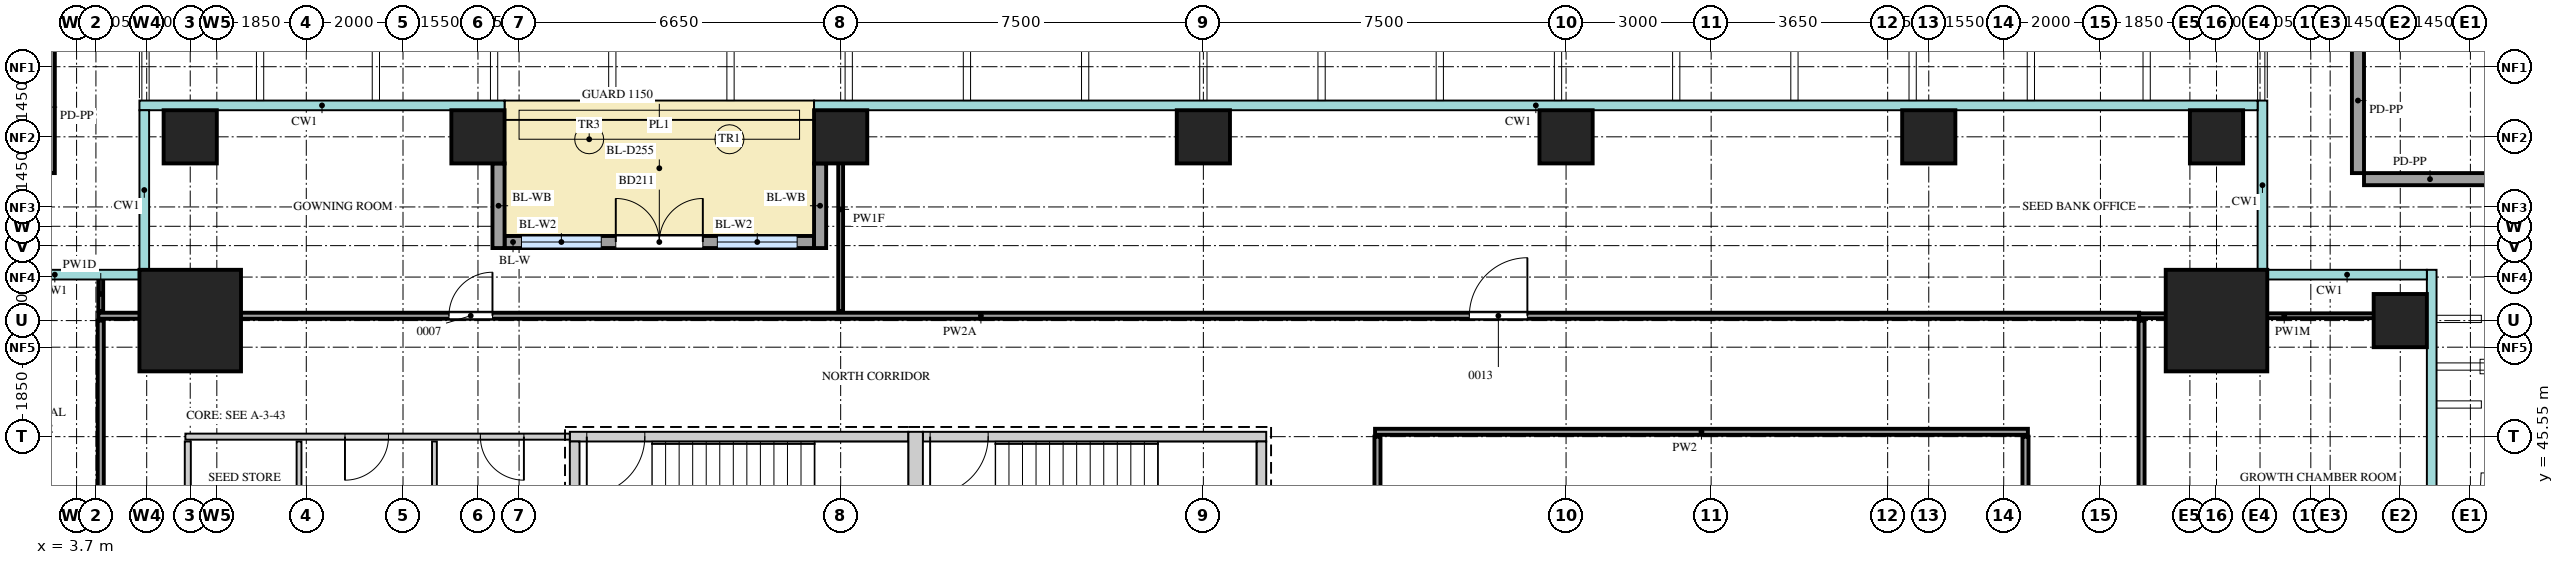
"""IFC4 building model, lengths in metres.
Left out: names, types, materials, properties, quantities, classifications, styles, units other than length and angle.
Written with IfcOpenShell. Run it as: python <this file> out.ifc"""

import sys

from ifc_helpers import new_model, si_unit, direction, frame, frame_2d, origin, origin_2d, place, context, subcontext, project, spatial, rectangle, extrude, source, transform, mapped, element, fill, save


model = new_model("IFC4")
c1 = context("Model", 3, precision=1e-05, world=origin(), true_north=direction((0.0, 1.0)))
c2 = subcontext(c1, "Body", "Model", "MODEL_VIEW")
j1 = project(units=[si_unit("LENGTHUNIT", "METRE"), si_unit("PLANEANGLEUNIT", "RADIAN")], contexts=[c1])
p1 = place(None, origin())
s1 = spatial("IfcSite", under=j1, at=p1, CompositionType="ELEMENT")
p2 = place(p1, origin())
s2 = spatial("IfcBuilding", under=s1, at=p2, CompositionType="ELEMENT")
p3 = place(p2, frame((0.0, 0.0, 101.5)))
s3 = spatial("IfcBuildingStorey", under=s2, at=p3, CompositionType="ELEMENT", Elevation=101.5)
m1 = source(origin(), c2, "Body", "SweptSolid", [
    extrude(rectangle(XDim=7.0, YDim=0.2, at=frame_2d((3.5, 0.0))), origin(), (0.0, 0.0, 1.0), 4.1),
])
p4 = place(p3, frame((13.9, 45.55, 0.0), z_axis=(0.0, 0.0, 1.0), x_axis=(1.0, 0.0, 0.0)))
e1 = element("IfcWall", 1, at=p4, inside=s3, PredefinedType="SHEAR", context=c2, shape_type="MappedRepresentation", body=[
    mapped(m1, transform((0.0, 0.0, 0.0))),
])
m2 = source(origin(), c2, "Body", "SweptSolid", [
    extrude(rectangle(XDim=1.2, YDim=2.1, at=frame_2d((0.6, 1.05))), frame((0.0, 0.11, 0.0), z_axis=(0.0, -1.0, 0.0), x_axis=(1.0, 0.0, 0.0)), (0.0, 0.0, 1.0), 0.22),
])
p5 = place(p4, frame((0.35, 0.0, 0.0)))
e2 = element("IfcOpeningElement", 2, at=p5, cuts=e1, PredefinedType="OPENING", context=c2, shape_type="MappedRepresentation", body=[
    mapped(m2, transform((0.0, 0.0, 0.0))),
])
m3 = source(origin(), c2, "Body", "SweptSolid", [
    extrude(rectangle(XDim=7.1, YDim=0.2, at=frame_2d((3.55, 0.0))), origin(), (0.0, 0.0, 1.0), 4.1),
])
p6 = place(p3, frame((21.2, 45.55, 0.0), z_axis=(0.0, 0.0, 1.0), x_axis=(1.0, 0.0, 0.0)))
e3 = element("IfcWall", 3, at=p6, inside=s3, PredefinedType="SHEAR", context=c2, shape_type="MappedRepresentation", body=[
    mapped(m3, transform((0.0, 0.0, 0.0))),
])
p7 = place(p6, frame((0.15, 0.0, 0.0)))
e4 = element("IfcOpeningElement", 4, at=p7, cuts=e3, PredefinedType="OPENING", context=c2, shape_type="MappedRepresentation", body=[
    mapped(m2, transform((0.0, 0.0, 0.0))),
])
m4 = source(origin(), c2, "Body", "SweptSolid", [
    extrude(rectangle(XDim=3.75, YDim=0.3, at=frame_2d((1.875, 0.0))), origin(), (0.0, 0.0, 1.0), 4.1),
])
p8 = place(p3, frame((21.05, 41.9, 0.0), z_axis=(0.0, 0.0, 1.0), x_axis=(0.0, 1.0, 0.0)))
e5 = element("IfcWall", 5, at=p8, inside=s3, PredefinedType="SHEAR", context=c2, shape_type="MappedRepresentation", body=[
    mapped(m4, transform((0.0, 0.0, 0.0))),
])
m5 = source(origin(), c2, "Body", "SweptSolid", [
    extrude(rectangle(XDim=3.35, YDim=0.2, at=frame_2d((1.675, 0.0))), origin(), (0.0, 0.0, 1.0), 4.1),
])
for number, where, z_axis, x_axis in (
    (6, (14.0, 42.1, 0.0), (0.0, 0.0, 1.0), (0.0, 1.0, 0.0)),
    (7, (28.2, 42.1, 0.0), (0.0, 0.0, 1.0), (0.0, 1.0, 0.0)),
):
    element("IfcWall", number, at=place(p3, frame(where, z_axis=z_axis, x_axis=x_axis)), inside=s3, PredefinedType="SHEAR", context=c2, shape_type="MappedRepresentation", body=[
        mapped(m5, transform((0.0, 0.0, 0.0))),
    ])
m6 = source(origin(), c2, "Body", "SweptSolid", [
    extrude(rectangle(XDim=2.1, YDim=2.1, at=origin_2d()), origin(), (0.0, 0.0, 1.0), 4.4),
])
for number, where, z_axis, x_axis in (
    (8, (47.95, 47.95, 0.0), (0.0, 0.0, 1.0), (1.0, 0.0, 0.0)),
    (9, (6.05, 47.95, 0.0), (0.0, 0.0, 1.0), (1.0, 0.0, 0.0)),
):
    element("IfcColumn", number, at=place(p3, frame(where, z_axis=z_axis, x_axis=x_axis)), inside=s3, PredefinedType="COLUMN", context=c2, shape_type="MappedRepresentation", body=[
        mapped(m6, transform((0.0, 0.0, 0.0))),
    ])
m7 = source(origin(), c2, "Body", "SweptSolid", [
    extrude(rectangle(XDim=1.1, YDim=1.1, at=origin_2d()), origin(), (0.0, 0.0, 1.0), 4.1),
])
for number, where, z_axis, x_axis in (
    (10, (51.75, 47.95, 0.0), (0.0, 0.0, 1.0), (1.0, 0.0, 0.0)),
    (11, (6.05, 51.75, 0.0), (0.0, 0.0, 1.0), (1.0, 0.0, 0.0)),
    (12, (12.0, 51.75, 0.0), (0.0, 0.0, 1.0), (1.0, 0.0, 0.0)),
    (13, (19.5, 51.75, 0.0), (0.0, 0.0, 1.0), (1.0, 0.0, 0.0)),
    (14, (27.0, 51.75, 0.0), (0.0, 0.0, 1.0), (1.0, 0.0, 0.0)),
    (15, (34.5, 51.75, 0.0), (0.0, 0.0, 1.0), (1.0, 0.0, 0.0)),
    (16, (42.0, 51.75, 0.0), (0.0, 0.0, 1.0), (1.0, 0.0, 0.0)),
    (17, (47.95, 51.75, 0.0), (0.0, 0.0, 1.0), (1.0, 0.0, 0.0)),
):
    element("IfcColumn", number, at=place(p3, frame(where, z_axis=z_axis, x_axis=x_axis)), inside=s3, PredefinedType="COLUMN", context=c2, shape_type="MappedRepresentation", body=[
        mapped(m7, transform((0.0, 0.0, 0.0))),
    ])
m8 = source(origin(), c2, "Body", "SweptSolid", [
    extrude(rectangle(XDim=6.4, YDim=0.25, at=frame_2d((3.2, 0.0))), origin(), (0.0, 0.0, 1.0), 4.1),
])
p9 = place(p3, frame((12.55, 49.575, 0.0), z_axis=(0.0, 0.0, 1.0), x_axis=(1.0, 0.0, 0.0)))
e18 = element("IfcWall", 18, at=p9, inside=s3, PredefinedType="SOLIDWALL", context=c2, shape_type="MappedRepresentation", body=[
    mapped(m8, transform((0.0, 0.0, 0.0))),
])
m9 = source(origin(), c2, "Body", "SweptSolid", [
    extrude(rectangle(XDim=1.65, YDim=2.4, at=frame_2d((0.825, 1.2))), frame((0.0, 0.135, 0.0), z_axis=(0.0, -1.0, 0.0), x_axis=(1.0, 0.0, 0.0)), (0.0, 0.0, 1.0), 0.27),
])
p10 = place(p9, frame((0.35, 0.0, 0.0)))
e19 = element("IfcOpeningElement", 19, at=p10, cuts=e18, PredefinedType="OPENING", context=c2, shape_type="MappedRepresentation", body=[
    mapped(m9, transform((0.0, 0.0, 0.0))),
])
p11 = place(p9, frame((4.4, 0.0, 0.0)))
e20 = element("IfcOpeningElement", 20, at=p11, cuts=e18, PredefinedType="OPENING", context=c2, shape_type="MappedRepresentation", body=[
    mapped(m9, transform((0.0, 0.0, 0.0))),
])
m10 = source(origin(), c2, "Body", "SweptSolid", [
    extrude(rectangle(XDim=1.8, YDim=2.4, at=frame_2d((0.9, 1.2))), frame((0.0, 0.135, 0.0), z_axis=(0.0, -1.0, 0.0), x_axis=(1.0, 0.0, 0.0)), (0.0, 0.0, 1.0), 0.27),
])
p12 = place(p9, frame((2.3, 0.0, 0.0)))
e21 = element("IfcOpeningElement", 21, at=p12, cuts=e18, PredefinedType="OPENING", context=c2, shape_type="MappedRepresentation", body=[
    mapped(m10, transform((0.0, 0.0, 0.0))),
])
m11 = source(origin(), c2, "Body", "SweptSolid", [
    extrude(rectangle(XDim=1.75, YDim=0.25, at=frame_2d((0.875, 0.0))), origin(), (0.0, 0.0, 1.0), 3.8),
])
for number, where, z_axis, x_axis in (
    (22, (12.425, 51.2, 0.0), (0.0, 0.0, 1.0), (0.0, -1.0, 0.0)),
    (23, (19.075, 51.2, 0.0), (0.0, 0.0, 1.0), (0.0, -1.0, 0.0)),
):
    element("IfcWall", number, at=place(p3, frame(where, z_axis=z_axis, x_axis=x_axis)), inside=s3, PredefinedType="SOLIDWALL", context=c2, shape_type="MappedRepresentation", body=[
        mapped(m11, transform((0.0, 0.0, 0.0))),
    ])
m12 = source(origin(), c2, "Body", "SweptSolid", [
    extrude(rectangle(XDim=2.73, YDim=0.25, at=frame_2d((1.365, 0.0))), origin(), (0.0, 0.0, 1.0), 1.1),
])
p13 = place(p3, frame((53.73, 50.875, 0.0), z_axis=(0.0, 0.0, 1.0), x_axis=(-1.0, 0.0, 0.0)))
e24 = element("IfcWall", 24, at=p13, inside=s3, PredefinedType="SOLIDWALL", context=c2, shape_type="MappedRepresentation", body=[
    mapped(m12, transform((0.0, 0.0, 0.0))),
])
m13 = source(origin(), c2, "Body", "SweptSolid", [
    extrude(rectangle(XDim=3.0, YDim=0.25, at=frame_2d((1.5, 0.0))), origin(), (0.0, 0.0, 1.0), 1.1),
])
p14 = place(p3, frame((50.875, 51.0, 0.0), z_axis=(0.0, 0.0, 1.0), x_axis=(0.0, 1.0, 0.0)))
e25 = element("IfcWall", 25, at=p14, inside=s3, PredefinedType="SOLIDWALL", context=c2, shape_type="MappedRepresentation", body=[
    mapped(m13, transform((0.0, 0.0, 0.0))),
])
p15 = place(p3, frame((3.125, 53.73, 0.0), z_axis=(0.0, 0.0, 1.0), x_axis=(0.0, -1.0, 0.0)))
e26 = element("IfcWall", 26, at=p15, inside=s3, PredefinedType="SOLIDWALL", context=c2, shape_type="MappedRepresentation", body=[
    mapped(m12, transform((0.0, 0.0, 0.0))),
])
m14 = source(origin(), c2, "Body", "SweptSolid", [
    extrude(rectangle(XDim=41.8, YDim=0.125, at=frame_2d((20.9, 0.0))), origin(), (0.0, 0.0, 1.0), 4.2),
])
p16 = place(p3, frame((4.2, 6.15, 0.0), z_axis=(0.0, 0.0, 1.0), x_axis=(0.0, 1.0, 0.0)))
e27 = element("IfcWall", 27, at=p16, inside=s3, PredefinedType="PARTITIONING", context=c2, shape_type="MappedRepresentation", body=[
    mapped(m14, transform((0.0, 0.0, 0.0))),
])
m15 = source(origin(), c2, "Body", "SweptSolid", [
    extrude(rectangle(XDim=0.9, YDim=2.1, at=frame_2d((0.45, 1.05))), frame((0.0, 0.073, 0.0), z_axis=(0.0, -1.0, 0.0), x_axis=(1.0, 0.0, 0.0)), (0.0, 0.0, 1.0), 0.145),
])
p17 = place(p16, frame((7.2, 0.0, 0.0)))
e28 = element("IfcOpeningElement", 28, at=p17, cuts=e27, PredefinedType="OPENING", context=c2, shape_type="MappedRepresentation", body=[
    mapped(m15, transform((0.0, 0.0, 0.0))),
])
p18 = place(p16, frame((21.8, 0.0, 0.0)))
e29 = element("IfcOpeningElement", 29, at=p18, cuts=e27, PredefinedType="OPENING", context=c2, shape_type="MappedRepresentation", body=[
    mapped(m15, transform((0.0, 0.0, 0.0))),
])
p19 = place(p16, frame((33.3, 0.0, 0.0)))
e30 = element("IfcOpeningElement", 30, at=p19, cuts=e27, PredefinedType="OPENING", context=c2, shape_type="MappedRepresentation", body=[
    mapped(m15, transform((0.0, 0.0, 0.0))),
])
m16 = source(origin(), c2, "Body", "SweptSolid", [
    extrude(rectangle(XDim=37.65, YDim=0.125, at=frame_2d((18.825, 0.0))), origin(), (0.0, 0.0, 1.0), 4.2),
])
p20 = place(p3, frame((46.4, 10.3, 0.0), z_axis=(0.0, 0.0, 1.0), x_axis=(0.0, 1.0, 0.0)))
e31 = element("IfcWall", 31, at=p20, inside=s3, PredefinedType="PARTITIONING", context=c2, shape_type="MappedRepresentation", body=[
    mapped(m16, transform((0.0, 0.0, 0.0))),
])
m17 = source(origin(), c2, "Body", "SweptSolid", [
    extrude(rectangle(XDim=1.2, YDim=2.1, at=frame_2d((0.6, 1.05))), frame((0.0, 0.073, 0.0), z_axis=(0.0, -1.0, 0.0), x_axis=(1.0, 0.0, 0.0)), (0.0, 0.0, 1.0), 0.145),
])
p21 = place(p20, frame((7.85, 0.0, 0.0)))
e32 = element("IfcOpeningElement", 32, at=p21, cuts=e31, PredefinedType="OPENING", context=c2, shape_type="MappedRepresentation", body=[
    mapped(m17, transform((0.0, 0.0, 0.0))),
])
p22 = place(p20, frame((23.6, 0.0, 0.0)))
e33 = element("IfcOpeningElement", 33, at=p22, cuts=e31, PredefinedType="OPENING", context=c2, shape_type="MappedRepresentation", body=[
    mapped(m17, transform((0.0, 0.0, 0.0))),
])
p23 = place(p20, frame((32.9, 0.0, 0.0)))
e34 = element("IfcOpeningElement", 34, at=p23, cuts=e31, PredefinedType="OPENING", context=c2, shape_type="MappedRepresentation", body=[
    mapped(m17, transform((0.0, 0.0, 0.0))),
])
m18 = source(origin(), c2, "Body", "SweptSolid", [
    extrude(rectangle(XDim=32.85, YDim=0.125, at=frame_2d((16.425, 0.0))), origin(), (0.0, 0.0, 1.0), 4.2),
])
p24 = place(p3, frame((44.0, 12.7, 0.0), z_axis=(0.0, 0.0, 1.0), x_axis=(0.0, 1.0, 0.0)))
e35 = element("IfcWall", 35, at=p24, inside=s3, PredefinedType="PARTITIONING", context=c2, shape_type="MappedRepresentation", body=[
    mapped(m18, transform((0.0, 0.0, 0.0))),
])
p25 = place(p24, frame((9.2, 0.0, 0.0)))
e36 = element("IfcOpeningElement", 36, at=p25, cuts=e35, PredefinedType="OPENING", context=c2, shape_type="MappedRepresentation", body=[
    mapped(m17, transform((0.0, 0.0, 0.0))),
])
p26 = place(p24, frame((27.5, 0.0, 0.0)))
e37 = element("IfcOpeningElement", 37, at=p26, cuts=e35, PredefinedType="OPENING", context=c2, shape_type="MappedRepresentation", body=[
    mapped(m17, transform((0.0, 0.0, 0.0))),
])
m19 = source(origin(), c2, "Body", "SweptSolid", [
    extrude(rectangle(XDim=9.45, YDim=0.125, at=frame_2d((4.725, 0.0))), origin(), (0.0, 0.0, 1.0), 4.2),
])
p27 = place(p3, frame((30.6, 36.1, 0.0), z_axis=(0.0, 0.0, 1.0), x_axis=(0.0, 1.0, 0.0)))
e38 = element("IfcWall", 38, at=p27, inside=s3, PredefinedType="PARTITIONING", context=c2, shape_type="MappedRepresentation", body=[
    mapped(m19, transform((0.0, 0.0, 0.0))),
])
m20 = source(origin(), c2, "Body", "SweptSolid", [
    extrude(rectangle(XDim=3.45, YDim=0.125, at=frame_2d((1.725, 0.0))), origin(), (0.0, 0.0, 1.0), 4.2),
])
p28 = place(p3, frame((6.0, 42.0, 0.0), z_axis=(0.0, 0.0, 1.0), x_axis=(0.0, 1.0, 0.0)))
e39 = element("IfcWall", 39, at=p28, inside=s3, PredefinedType="PARTITIONING", context=c2, shape_type="MappedRepresentation", body=[
    mapped(m20, transform((0.0, 0.0, 0.0))),
])
p29 = place(p28, frame((1.2, 0.0, 0.0)))
e40 = element("IfcOpeningElement", 40, at=p29, cuts=e39, PredefinedType="OPENING", context=c2, shape_type="MappedRepresentation", body=[
    mapped(m15, transform((0.0, 0.0, 0.0))),
])
m21 = source(origin(), c2, "Body", "SweptSolid", [
    extrude(rectangle(XDim=3.45, YDim=0.1, at=frame_2d((1.725, 0.0))), origin(), (0.0, 0.0, 1.0), 4.2),
])
for number, where, z_axis, x_axis in (
    (41, (8.3, 42.0, 0.0), (0.0, 0.0, 1.0), (0.0, 1.0, 0.0)),
    (42, (11.1, 42.0, 0.0), (0.0, 0.0, 1.0), (0.0, 1.0, 0.0)),
):
    element("IfcWall", number, at=place(p3, frame(where, z_axis=z_axis, x_axis=x_axis)), inside=s3, PredefinedType="PARTITIONING", context=c2, shape_type="MappedRepresentation", body=[
        mapped(m21, transform((0.0, 0.0, 0.0))),
    ])
m22 = source(origin(), c2, "Body", "SweptSolid", [
    extrude(rectangle(XDim=7.95, YDim=0.125, at=frame_2d((3.975, 0.0))), origin(), (0.0, 0.0, 1.0), 4.2),
])
p30 = place(p3, frame((5.95, 45.55, 0.0), z_axis=(0.0, 0.0, 1.0), x_axis=(1.0, 0.0, 0.0)))
e43 = element("IfcWall", 43, at=p30, inside=s3, PredefinedType="PARTITIONING", context=c2, shape_type="MappedRepresentation", body=[
    mapped(m22, transform((0.0, 0.0, 0.0))),
])
p31 = place(p30, frame((3.3, 0.0, 0.0)))
e44 = element("IfcOpeningElement", 44, at=p31, cuts=e43, PredefinedType="OPENING", context=c2, shape_type="MappedRepresentation", body=[
    mapped(m15, transform((0.0, 0.0, 0.0))),
])
p32 = place(p30, frame((6.1, 0.0, 0.0)))
e45 = element("IfcOpeningElement", 45, at=p32, cuts=e43, PredefinedType="OPENING", context=c2, shape_type="MappedRepresentation", body=[
    mapped(m15, transform((0.0, 0.0, 0.0))),
])
m23 = source(origin(), c2, "Body", "SweptSolid", [
    extrude(rectangle(XDim=13.5, YDim=0.125, at=frame_2d((6.75, 0.0))), origin(), (0.0, 0.0, 1.0), 4.2),
])
p33 = place(p3, frame((30.55, 45.65, 0.0), z_axis=(0.0, 0.0, 1.0), x_axis=(1.0, 0.0, 0.0)))
e46 = element("IfcWall", 46, at=p33, inside=s3, PredefinedType="PARTITIONING", context=c2, shape_type="MappedRepresentation", body=[
    mapped(m23, transform((0.0, 0.0, 0.0))),
])
m24 = source(origin(), c2, "Body", "SweptSolid", [
    extrude(rectangle(XDim=42.2, YDim=0.125, at=frame_2d((21.1, 0.0))), origin(), (0.0, 0.0, 1.0), 3.55),
])
p34 = place(p3, frame((4.15, 48.05, 0.0), z_axis=(0.0, 0.0, 1.0), x_axis=(1.0, 0.0, 0.0)))
e47 = element("IfcWall", 47, at=p34, inside=s3, PredefinedType="PARTITIONING", context=c2, shape_type="MappedRepresentation", body=[
    mapped(m24, transform((0.0, 0.0, 0.0))),
])
p35 = place(p34, frame((7.25, 0.0, 0.0)))
e48 = element("IfcOpeningElement", 48, at=p35, cuts=e47, PredefinedType="OPENING", context=c2, shape_type="MappedRepresentation", body=[
    mapped(m15, transform((0.0, 0.0, 0.0))),
])
p36 = place(p34, frame((28.35, 0.0, 0.0)))
e49 = element("IfcOpeningElement", 49, at=p36, cuts=e47, PredefinedType="OPENING", context=c2, shape_type="MappedRepresentation", body=[
    mapped(m17, transform((0.0, 0.0, 0.0))),
])
m25 = source(origin(), c2, "Body", "SweptSolid", [
    extrude(rectangle(XDim=6.0, YDim=0.1, at=frame_2d((3.0, 0.0))), origin(), (0.0, 0.0, 1.0), 3.55),
])
p37 = place(p3, frame((46.35, 48.05, 0.0), z_axis=(0.0, 0.0, 1.0), x_axis=(1.0, 0.0, 0.0)))
e50 = element("IfcWall", 50, at=p37, inside=s3, PredefinedType="PARTITIONING", context=c2, shape_type="MappedRepresentation", body=[
    mapped(m25, transform((0.0, 0.0, 0.0))),
])
m26 = source(origin(), c2, "Body", "SweptSolid", [
    extrude(rectangle(XDim=0.7, YDim=0.1, at=frame_2d((0.35, 0.0))), origin(), (0.0, 0.0, 1.0), 4.2),
])
p38 = place(p3, frame((4.2, 48.15, 0.0), z_axis=(0.0, 0.0, 1.0), x_axis=(0.0, 1.0, 0.0)))
e51 = element("IfcWall", 51, at=p38, inside=s3, PredefinedType="PARTITIONING", context=c2, shape_type="MappedRepresentation", body=[
    mapped(m26, transform((0.0, 0.0, 0.0))),
])
m27 = source(origin(), c2, "Body", "SweptSolid", [
    extrude(rectangle(XDim=4.2, YDim=0.1, at=frame_2d((2.1, 0.0))), origin(), (0.0, 0.0, 1.0), 3.77),
])
p39 = place(p3, frame((19.5, 48.15, 0.0), z_axis=(0.0, 0.0, 1.0), x_axis=(0.0, 1.0, 0.0)))
e52 = element("IfcWall", 52, at=p39, inside=s3, PredefinedType="PARTITIONING", context=c2, shape_type="MappedRepresentation", body=[
    mapped(m27, transform((0.0, 0.0, 0.0))),
])
m28 = source(origin(), c2, "Body", "SweptSolid", [
    extrude(rectangle(XDim=1.65, YDim=2.4, at=frame_2d((0.825, 1.2))), frame((0.0, 0.03, 0.0), z_axis=(0.0, -1.0, 0.0), x_axis=(1.0, 0.0, 0.0)), (0.0, 0.0, 1.0), 0.06),
])
p40 = place(p10, origin())
e53 = element("IfcWindow", 53, at=p40, inside=s3, PartitioningType="SINGLE_PANEL", PredefinedType="WINDOW", context=c2, shape_type="MappedRepresentation", body=[
    mapped(m28, transform((0.0, 0.0, 0.0))),
])
fill(e19, e53)
p41 = place(p11, origin())
e54 = element("IfcWindow", 54, at=p41, inside=s3, PartitioningType="SINGLE_PANEL", PredefinedType="WINDOW", context=c2, shape_type="MappedRepresentation", body=[
    mapped(m28, transform((0.0, 0.0, 0.0))),
])
fill(e20, e54)
m29 = source(origin(), c2, "Body", "SweptSolid", [
    extrude(rectangle(XDim=1.8, YDim=2.4, at=frame_2d((0.9, 1.2))), frame((0.0, 0.025, 0.0), z_axis=(0.0, -1.0, 0.0), x_axis=(1.0, 0.0, 0.0)), (0.0, 0.0, 1.0), 0.05),
])
p42 = place(p12, origin())
e55 = element("IfcDoor", 55, at=p42, inside=s3, OperationType="DOUBLE_DOOR_DOUBLE_SWING", PredefinedType="DOOR", context=c2, shape_type="MappedRepresentation", body=[
    mapped(m29, transform((0.0, 0.0, 0.0))),
])
fill(e21, e55)
m30 = source(origin(), c2, "Body", "SweptSolid", [
    extrude(rectangle(XDim=0.9, YDim=2.1, at=frame_2d((0.45, 1.05))), frame((0.0, 0.025, 0.0), z_axis=(0.0, -1.0, 0.0), x_axis=(1.0, 0.0, 0.0)), (0.0, 0.0, 1.0), 0.05),
])
p43 = place(p35, origin())
e56 = element("IfcDoor", 56, at=p43, inside=s3, OperationType="SINGLE_SWING_LEFT", PredefinedType="DOOR", context=c2, shape_type="MappedRepresentation", body=[
    mapped(m30, transform((0.0, 0.0, 0.0))),
])
fill(e48, e56)
m31 = source(origin(), c2, "Body", "SweptSolid", [
    extrude(rectangle(XDim=1.2, YDim=2.1, at=frame_2d((0.6, 1.05))), frame((0.0, 0.025, 0.0), z_axis=(0.0, -1.0, 0.0), x_axis=(1.0, 0.0, 0.0)), (0.0, 0.0, 1.0), 0.05),
])
p44 = place(p36, origin())
e57 = element("IfcDoor", 57, at=p44, inside=s3, OperationType="SINGLE_SWING_LEFT", PredefinedType="DOOR", context=c2, shape_type="MappedRepresentation", body=[
    mapped(m31, transform((0.0, 0.0, 0.0))),
])
fill(e49, e57)
p45 = place(p31, origin())
e58 = element("IfcDoor", 58, at=p45, inside=s3, OperationType="SINGLE_SWING_LEFT", PredefinedType="DOOR", context=c2, shape_type="MappedRepresentation", body=[
    mapped(m30, transform((0.0, 0.0, 0.0))),
])
fill(e44, e58)
p46 = place(p32, origin())
e59 = element("IfcDoor", 59, at=p46, inside=s3, OperationType="SINGLE_SWING_RIGHT", PredefinedType="DOOR", context=c2, shape_type="MappedRepresentation", body=[
    mapped(m30, transform((0.0, 0.0, 0.0))),
])
fill(e45, e59)
p47 = place(p5, origin())
e60 = element("IfcDoor", 60, at=p47, inside=s3, OperationType="SINGLE_SWING_LEFT", PredefinedType="DOOR", context=c2, shape_type="MappedRepresentation", body=[
    mapped(m31, transform((0.0, 0.0, 0.0))),
])
fill(e2, e60)
p48 = place(p7, origin())
e61 = element("IfcDoor", 61, at=p48, inside=s3, OperationType="SINGLE_SWING_LEFT", PredefinedType="DOOR", context=c2, shape_type="MappedRepresentation", body=[
    mapped(m31, transform((0.0, 0.0, 0.0))),
])
fill(e4, e61)
save(model, sys.argv[1])
